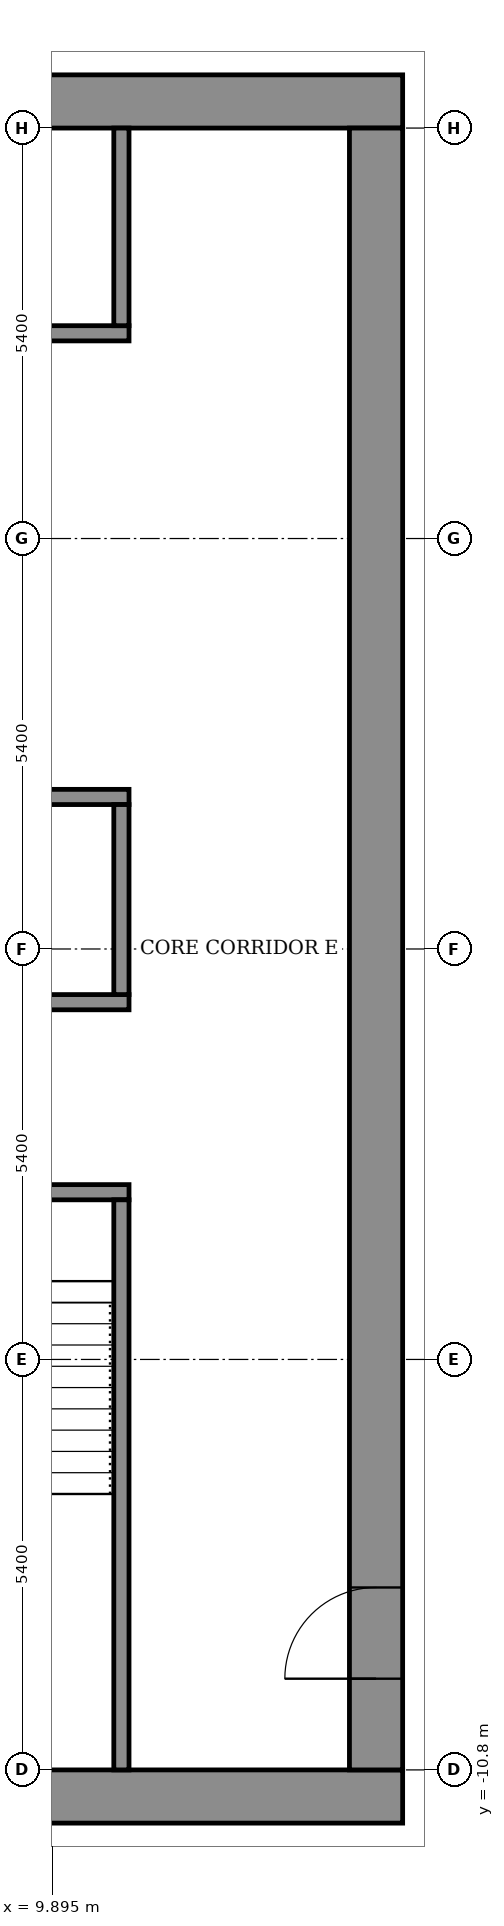
"""IFC4 building model, lengths in metres.
Left out: names, types, materials, properties, quantities, classifications, styles, units other than length and angle.
Written with IfcOpenShell. Run it as: python <this file> out.ifc"""

import sys

from ifc_helpers import new_model, si_unit, direction, frame, frame_2d, origin, place, context, subcontext, project, spatial, rectangle, extrude, element, fill, save


model = new_model("IFC4")
c1 = context("Model", 3, precision=1e-05, world=origin(), true_north=direction((0.0, 1.0)))
c2 = subcontext(c1, "Body", "Model", "MODEL_VIEW")
j1 = project(units=[si_unit("LENGTHUNIT", "METRE"), si_unit("PLANEANGLEUNIT", "RADIAN")], contexts=[c1])
p1 = place(None, origin())
s1 = spatial("IfcSite", under=j1, at=p1, CompositionType="ELEMENT")
p2 = place(p1, origin())
s2 = spatial("IfcBuilding", under=s1, at=p2, CompositionType="ELEMENT")
p3 = place(p2, frame((0.0, 0.0, 271.7)))
s3 = spatial("IfcBuildingStorey", under=s2, at=p3, CompositionType="ELEMENT", Elevation=271.7)
for number, where, z_axis, x_axis in (
    (1, (-14.5, -11.15, 0.0), (0.0, 0.0, 1.0), (1.0, 0.0, 0.0)),
    (2, (-14.5, 11.15, 0.0), (0.0, 0.0, 1.0), (1.0, 0.0, 0.0)),
):
    element("IfcWall", number, at=place(p3, frame(where, z_axis=z_axis, x_axis=x_axis)), inside=s3, PredefinedType="SHEAR", context=c2, shape_type="SweptSolid", body=[
        extrude(rectangle(XDim=29.0, YDim=0.7, at=frame_2d((14.5, 0.0))), origin(), (0.0, 0.0, 1.0), 3.6),
    ])
p4 = place(p3, frame((14.15, -10.8, 0.0), z_axis=(0.0, 0.0, 1.0), x_axis=(0.0, 1.0, 0.0)))
e3 = element("IfcWall", 3, at=p4, inside=s3, PredefinedType="SHEAR", context=c2, shape_type="SweptSolid", body=[
    extrude(rectangle(XDim=21.6, YDim=0.7, at=frame_2d((10.8, 0.0))), origin(), (0.0, 0.0, 1.0), 3.6),
])
p5 = place(p4, frame((1.2, 0.0, 0.0)))
e4 = element("IfcOpeningElement", 4, at=p5, cuts=e3, PredefinedType="OPENING", context=c2, shape_type="SweptSolid", body=[
    extrude(rectangle(XDim=1.2, YDim=2.1, at=frame_2d((0.6, 1.05))), frame((0.0, 0.36, 0.0), z_axis=(0.0, -1.0, 0.0), x_axis=(1.0, 0.0, 0.0)), (0.0, 0.0, 1.0), 0.72),
])
p6 = place(p3, frame((-10.9, -3.2, 0.0), z_axis=(0.0, 0.0, 1.0), x_axis=(1.0, 0.0, 0.0)))
e5 = element("IfcWall", 5, at=p6, inside=s3, PredefinedType="SHEAR", context=c2, shape_type="SweptSolid", body=[
    extrude(rectangle(XDim=21.8, YDim=0.2, at=frame_2d((10.9, 0.0))), origin(), (0.0, 0.0, 1.0), 3.05),
])
p7 = place(p6, frame((1.075, 0.0, 0.0)))
e6 = element("IfcOpeningElement", 6, at=p7, cuts=e5, PredefinedType="OPENING", context=c2, shape_type="SweptSolid", body=[
    extrude(rectangle(XDim=1.1, YDim=2.1, at=frame_2d((0.55, 1.05))), frame((0.0, 0.11, 0.0), z_axis=(0.0, -1.0, 0.0), x_axis=(1.0, 0.0, 0.0)), (0.0, 0.0, 1.0), 0.22),
])
p8 = place(p6, frame((10.325, 0.0, 0.0)))
e7 = element("IfcOpeningElement", 7, at=p8, cuts=e5, PredefinedType="OPENING", context=c2, shape_type="SweptSolid", body=[
    extrude(rectangle(XDim=1.1, YDim=2.1, at=frame_2d((0.55, 1.05))), frame((0.0, 0.11, 0.0), z_axis=(0.0, -1.0, 0.0), x_axis=(1.0, 0.0, 0.0)), (0.0, 0.0, 1.0), 0.22),
])
p9 = place(p6, frame((19.625, 0.0, 0.0)))
e8 = element("IfcOpeningElement", 8, at=p9, cuts=e5, PredefinedType="OPENING", context=c2, shape_type="SweptSolid", body=[
    extrude(rectangle(XDim=1.1, YDim=2.1, at=frame_2d((0.55, 1.05))), frame((0.0, 0.11, 0.0), z_axis=(0.0, -1.0, 0.0), x_axis=(1.0, 0.0, 0.0)), (0.0, 0.0, 1.0), 0.22),
])
p10 = place(p6, frame((5.7, 0.0, 0.0)))
e9 = element("IfcOpeningElement", 9, at=p10, cuts=e5, PredefinedType="OPENING", context=c2, shape_type="SweptSolid", body=[
    extrude(rectangle(XDim=1.1, YDim=2.1, at=frame_2d((0.55, 1.05))), frame((0.0, 0.11, 0.0), z_axis=(0.0, -1.0, 0.0), x_axis=(1.0, 0.0, 0.0)), (0.0, 0.0, 1.0), 0.22),
])
p11 = place(p6, frame((14.975, 0.0, 0.0)))
e10 = element("IfcOpeningElement", 10, at=p11, cuts=e5, PredefinedType="OPENING", context=c2, shape_type="SweptSolid", body=[
    extrude(rectangle(XDim=1.1, YDim=2.1, at=frame_2d((0.55, 1.05))), frame((0.0, 0.11, 0.0), z_axis=(0.0, -1.0, 0.0), x_axis=(1.0, 0.0, 0.0)), (0.0, 0.0, 1.0), 0.22),
])
p12 = place(p3, frame((-10.9, -0.7, 0.0), z_axis=(0.0, 0.0, 1.0), x_axis=(1.0, 0.0, 0.0)))
e11 = element("IfcWall", 11, at=p12, inside=s3, PredefinedType="SHEAR", context=c2, shape_type="SweptSolid", body=[
    extrude(rectangle(XDim=21.8, YDim=0.2, at=frame_2d((10.9, 0.0))), origin(), (0.0, 0.0, 1.0), 3.05),
])
p13 = place(p3, frame((-10.9, 2.0, 0.0), z_axis=(0.0, 0.0, 1.0), x_axis=(1.0, 0.0, 0.0)))
e12 = element("IfcWall", 12, at=p13, inside=s3, PredefinedType="SHEAR", context=c2, shape_type="SweptSolid", body=[
    extrude(rectangle(XDim=21.8, YDim=0.2, at=frame_2d((10.9, 0.0))), origin(), (0.0, 0.0, 1.0), 3.05),
])
p14 = place(p13, frame((4.95, 0.0, 0.0)))
e13 = element("IfcOpeningElement", 13, at=p14, cuts=e12, PredefinedType="OPENING", context=c2, shape_type="SweptSolid", body=[
    extrude(rectangle(XDim=1.1, YDim=2.1, at=frame_2d((0.55, 1.05))), frame((0.0, 0.11, 0.0), z_axis=(0.0, -1.0, 0.0), x_axis=(1.0, 0.0, 0.0)), (0.0, 0.0, 1.0), 0.22),
])
p15 = place(p13, frame((7.65, 0.0, 0.0)))
e14 = element("IfcOpeningElement", 14, at=p15, cuts=e12, PredefinedType="OPENING", context=c2, shape_type="SweptSolid", body=[
    extrude(rectangle(XDim=1.1, YDim=2.1, at=frame_2d((0.55, 1.05))), frame((0.0, 0.11, 0.0), z_axis=(0.0, -1.0, 0.0), x_axis=(1.0, 0.0, 0.0)), (0.0, 0.0, 1.0), 0.22),
])
p16 = place(p13, frame((10.35, 0.0, 0.0)))
e15 = element("IfcOpeningElement", 15, at=p16, cuts=e12, PredefinedType="OPENING", context=c2, shape_type="SweptSolid", body=[
    extrude(rectangle(XDim=1.1, YDim=2.1, at=frame_2d((0.55, 1.05))), frame((0.0, 0.11, 0.0), z_axis=(0.0, -1.0, 0.0), x_axis=(1.0, 0.0, 0.0)), (0.0, 0.0, 1.0), 0.22),
])
p17 = place(p13, frame((1.675, 0.0, 0.0)))
e16 = element("IfcOpeningElement", 16, at=p17, cuts=e12, PredefinedType="OPENING", context=c2, shape_type="SweptSolid", body=[
    extrude(rectangle(XDim=0.9, YDim=2.1, at=frame_2d((0.45, 1.05))), frame((0.0, 0.11, 0.0), z_axis=(0.0, -1.0, 0.0), x_axis=(1.0, 0.0, 0.0)), (0.0, 0.0, 1.0), 0.22),
])
p18 = place(p13, frame((13.825, 0.0, 0.0)))
e17 = element("IfcOpeningElement", 17, at=p18, cuts=e12, PredefinedType="OPENING", context=c2, shape_type="SweptSolid", body=[
    extrude(rectangle(XDim=0.9, YDim=2.1, at=frame_2d((0.45, 1.05))), frame((0.0, 0.11, 0.0), z_axis=(0.0, -1.0, 0.0), x_axis=(1.0, 0.0, 0.0)), (0.0, 0.0, 1.0), 0.22),
])
p19 = place(p13, frame((18.55, 0.0, 0.0)))
e18 = element("IfcOpeningElement", 18, at=p19, cuts=e12, PredefinedType="OPENING", context=c2, shape_type="SweptSolid", body=[
    extrude(rectangle(XDim=0.9, YDim=2.1, at=frame_2d((0.45, 1.05))), frame((0.0, 0.11, 0.0), z_axis=(0.0, -1.0, 0.0), x_axis=(1.0, 0.0, 0.0)), (0.0, 0.0, 1.0), 0.22),
])
p20 = place(p3, frame((-10.9, 8.1, 0.0), z_axis=(0.0, 0.0, 1.0), x_axis=(1.0, 0.0, 0.0)))
e19 = element("IfcWall", 19, at=p20, inside=s3, PredefinedType="SHEAR", context=c2, shape_type="SweptSolid", body=[
    extrude(rectangle(XDim=21.8, YDim=0.2, at=frame_2d((10.9, 0.0))), origin(), (0.0, 0.0, 1.0), 3.05),
])
p21 = place(p20, frame((4.95, 0.0, 0.0)))
e20 = element("IfcOpeningElement", 20, at=p21, cuts=e19, PredefinedType="OPENING", context=c2, shape_type="SweptSolid", body=[
    extrude(rectangle(XDim=1.1, YDim=2.1, at=frame_2d((0.55, 1.05))), frame((0.0, 0.11, 0.0), z_axis=(0.0, -1.0, 0.0), x_axis=(1.0, 0.0, 0.0)), (0.0, 0.0, 1.0), 0.22),
])
p22 = place(p20, frame((7.65, 0.0, 0.0)))
e21 = element("IfcOpeningElement", 21, at=p22, cuts=e19, PredefinedType="OPENING", context=c2, shape_type="SweptSolid", body=[
    extrude(rectangle(XDim=1.1, YDim=2.1, at=frame_2d((0.55, 1.05))), frame((0.0, 0.11, 0.0), z_axis=(0.0, -1.0, 0.0), x_axis=(1.0, 0.0, 0.0)), (0.0, 0.0, 1.0), 0.22),
])
p23 = place(p20, frame((10.35, 0.0, 0.0)))
e22 = element("IfcOpeningElement", 22, at=p23, cuts=e19, PredefinedType="OPENING", context=c2, shape_type="SweptSolid", body=[
    extrude(rectangle(XDim=1.1, YDim=2.1, at=frame_2d((0.55, 1.05))), frame((0.0, 0.11, 0.0), z_axis=(0.0, -1.0, 0.0), x_axis=(1.0, 0.0, 0.0)), (0.0, 0.0, 1.0), 0.22),
])
p24 = place(p20, frame((1.675, 0.0, 0.0)))
e23 = element("IfcOpeningElement", 23, at=p24, cuts=e19, PredefinedType="OPENING", context=c2, shape_type="SweptSolid", body=[
    extrude(rectangle(XDim=0.9, YDim=2.1, at=frame_2d((0.45, 1.05))), frame((0.0, 0.11, 0.0), z_axis=(0.0, -1.0, 0.0), x_axis=(1.0, 0.0, 0.0)), (0.0, 0.0, 1.0), 0.22),
])
p25 = place(p20, frame((13.825, 0.0, 0.0)))
e24 = element("IfcOpeningElement", 24, at=p25, cuts=e19, PredefinedType="OPENING", context=c2, shape_type="SweptSolid", body=[
    extrude(rectangle(XDim=0.9, YDim=2.1, at=frame_2d((0.45, 1.05))), frame((0.0, 0.11, 0.0), z_axis=(0.0, -1.0, 0.0), x_axis=(1.0, 0.0, 0.0)), (0.0, 0.0, 1.0), 0.22),
])
p26 = place(p20, frame((18.55, 0.0, 0.0)))
e25 = element("IfcOpeningElement", 25, at=p26, cuts=e19, PredefinedType="OPENING", context=c2, shape_type="SweptSolid", body=[
    extrude(rectangle(XDim=0.9, YDim=2.1, at=frame_2d((0.45, 1.05))), frame((0.0, 0.11, 0.0), z_axis=(0.0, -1.0, 0.0), x_axis=(1.0, 0.0, 0.0)), (0.0, 0.0, 1.0), 0.22),
])
p27 = place(p3, frame((10.8, -10.8, 0.0), z_axis=(0.0, 0.0, 1.0), x_axis=(0.0, 1.0, 0.0)))
e26 = element("IfcWall", 26, at=p27, inside=s3, PredefinedType="SHEAR", context=c2, shape_type="SweptSolid", body=[
    extrude(rectangle(XDim=7.5, YDim=0.2, at=frame_2d((3.75, 0.0))), origin(), (0.0, 0.0, 1.0), 3.05),
])
p28 = place(p3, frame((10.8, -0.6, 0.0), z_axis=(0.0, 0.0, 1.0), x_axis=(0.0, 1.0, 0.0)))
e27 = element("IfcWall", 27, at=p28, inside=s3, PredefinedType="STANDARD", context=c2, shape_type="SweptSolid", body=[
    extrude(rectangle(XDim=2.5, YDim=0.2, at=frame_2d((1.25, 0.0))), origin(), (0.0, 0.0, 1.0), 3.05),
])
p29 = place(p3, frame((10.8, 8.2, 0.0), z_axis=(0.0, 0.0, 1.0), x_axis=(0.0, 1.0, 0.0)))
e28 = element("IfcWall", 28, at=p29, inside=s3, PredefinedType="STANDARD", context=c2, shape_type="SweptSolid", body=[
    extrude(rectangle(XDim=2.6, YDim=0.2, at=frame_2d((1.3, 0.0))), origin(), (0.0, 0.0, 1.0), 3.05),
])
p30 = place(p5, origin())
e29 = element("IfcDoor", 29, at=p30, inside=s3, OperationType="DOUBLE_DOOR_SINGLE_SWING", PredefinedType="DOOR", context=c2, shape_type="SweptSolid", body=[
    extrude(rectangle(XDim=1.2, YDim=2.1, at=frame_2d((0.6, 1.05))), frame((0.0, 0.025, 0.0), z_axis=(0.0, -1.0, 0.0), x_axis=(1.0, 0.0, 0.0)), (0.0, 0.0, 1.0), 0.05),
])
fill(e4, e29)
save(model, sys.argv[1])
